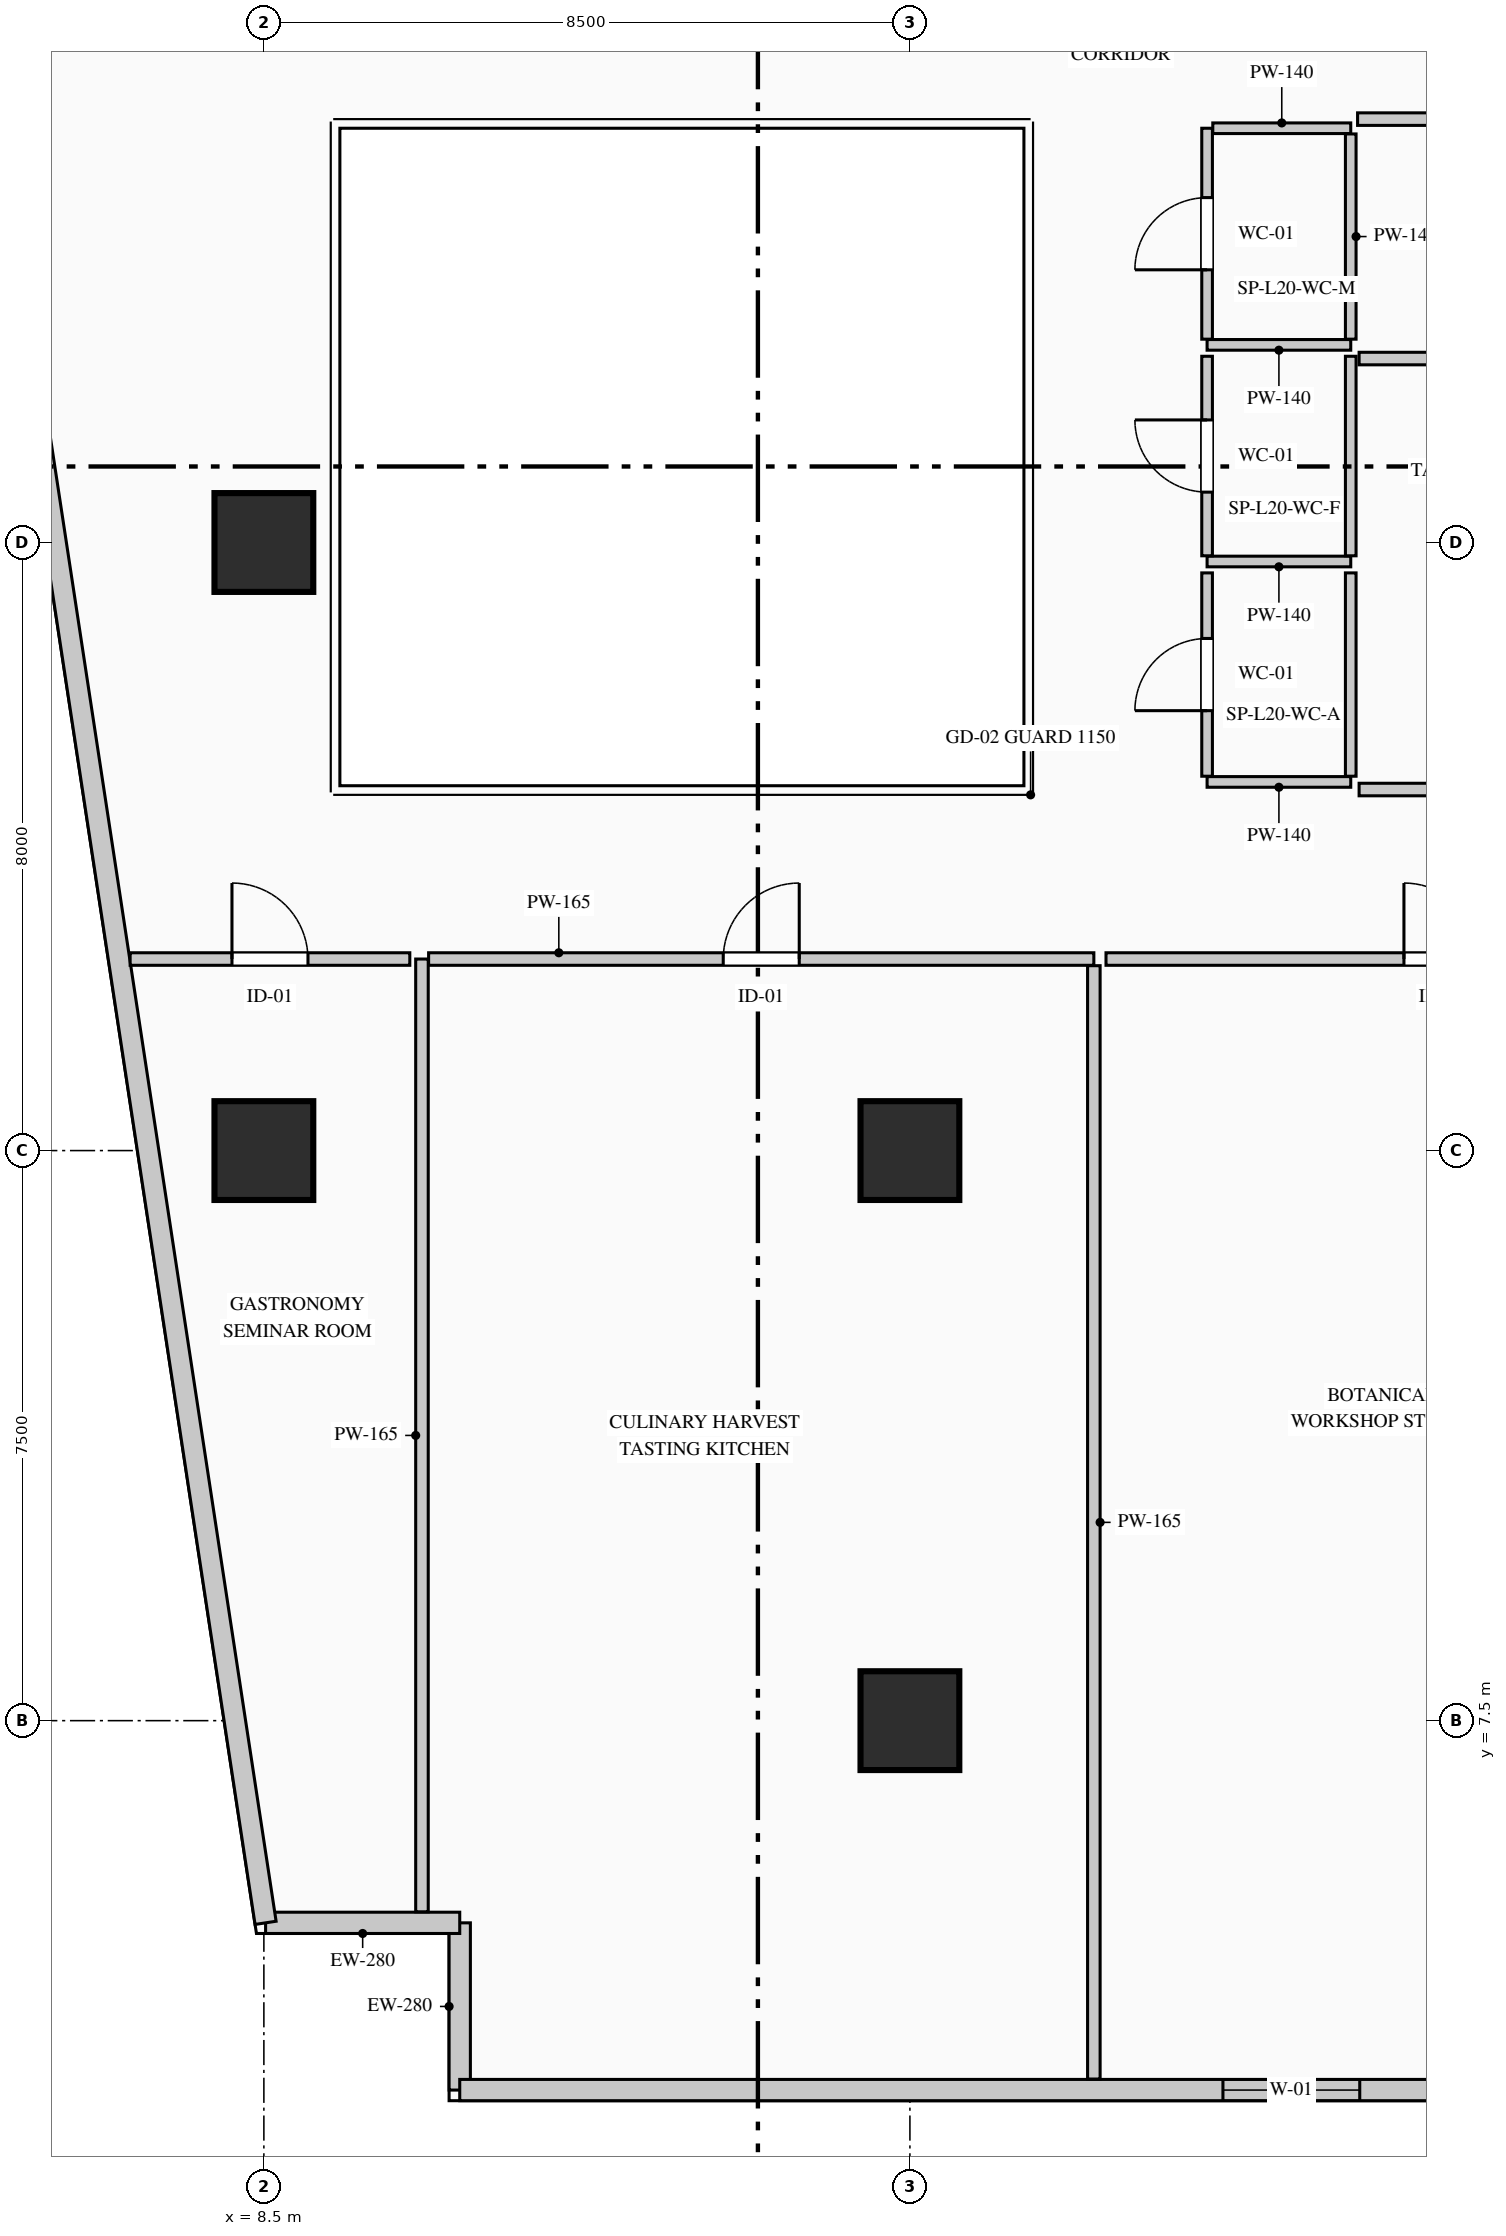
"""IFC4 building model, lengths in metres.
Left out: names, types, materials, properties, quantities, classifications, styles, units other than length and angle.
Written with IfcOpenShell. Run it as: python <this file> out.ifc"""

import sys

from ifc_helpers import new_model, si_unit, direction, frame, frame_2d, origin, origin_2d, place, context, subcontext, project, spatial, rectangle, extrude, element, fill, save


model = new_model("IFC4")
c1 = context("Model", 3, precision=1e-05, world=origin(), true_north=direction((0.0, 1.0)))
c2 = subcontext(c1, "Body", "Model", "MODEL_VIEW")
j1 = project(units=[si_unit("LENGTHUNIT", "METRE"), si_unit("PLANEANGLEUNIT", "RADIAN")], contexts=[c1])
p1 = place(None, origin())
s1 = spatial("IfcSite", under=j1, at=p1, CompositionType="ELEMENT")
p2 = place(p1, origin())
s2 = spatial("IfcBuilding", under=s1, at=p2, CompositionType="ELEMENT")
p3 = place(p2, frame((0.0, 0.0, 88.6)))
s3 = spatial("IfcBuildingStorey", under=s2, at=p3, CompositionType="ELEMENT", Elevation=88.6)
for number, where, z_axis, x_axis in (
    (1, (8.5, 15.0, 0.0), (0.0, 0.0, 1.0), (1.0, 0.0, 0.0)),
    (2, (8.5, 23.0, 0.0), (0.0, 0.0, 1.0), (1.0, 0.0, 0.0)),
    (3, (17.0, 7.5, 0.0), (0.0, 0.0, 1.0), (1.0, 0.0, 0.0)),
    (4, (17.0, 15.0, 0.0), (0.0, 0.0, 1.0), (1.0, 0.0, 0.0)),
):
    element("IfcColumn", number, at=place(p3, frame(where, z_axis=z_axis, x_axis=x_axis)), inside=s3, PredefinedType="COLUMN", context=c2, shape_type="SweptSolid", body=[
        extrude(rectangle(XDim=1.3, YDim=1.3, at=origin_2d()), origin(), (0.0, 0.0, 1.0), 4.4),
    ])
p4 = place(p3, frame((11.077, 2.64, 0.0), z_axis=(0.0, 0.0, 1.0), x_axis=(0.0, 1.0, 0.0)))
e5 = element("IfcWall", 5, at=p4, inside=s3, PredefinedType="STANDARD", context=c2, shape_type="SweptSolid", body=[
    extrude(rectangle(XDim=2.2, YDim=0.28, at=frame_2d((1.1, 0.0))), origin(), (0.0, 0.0, 1.0), 4.115),
])
p5 = place(p3, frame((11.077, 4.84, 0.0), z_axis=(0.0, 0.0, 1.0), x_axis=(-1.0, 0.0, 0.0)))
e6 = element("IfcWall", 6, at=p5, inside=s3, PredefinedType="STANDARD", context=c2, shape_type="SweptSolid", body=[
    extrude(rectangle(XDim=2.554, YDim=0.28, at=frame_2d((1.277, 0.0))), origin(), (0.0, 0.0, 1.0), 4.115),
])
p6 = place(p3, frame((8.523, 4.84, 0.0), z_axis=(0.0, 0.0, 1.0), x_axis=(-0.150394554312, 0.988626055712, 0.0)))
e7 = element("IfcWall", 7, at=p6, inside=s3, PredefinedType="STANDARD", context=c2, shape_type="SweptSolid", body=[
    extrude(rectangle(XDim=36.738, YDim=0.28, at=frame_2d((18.369, 0.0))), origin(), (0.0, 0.0, 1.0), 4.115),
])
p7 = place(p6, frame((22.612, 0.0, 0.9)))
e8 = element("IfcOpeningElement", 8, at=p7, cuts=e7, PredefinedType="OPENING", context=c2, shape_type="SweptSolid", body=[
    extrude(rectangle(XDim=1.8, YDim=2.1, at=frame_2d((0.9, 1.05))), frame((0.0, 0.15, 0.0), z_axis=(0.0, -1.0, 0.0), x_axis=(1.0, 0.0, 0.0)), (0.0, 0.0, 1.0), 0.3),
])
p8 = place(p3, frame((26.273, 2.64, 0.0), z_axis=(0.0, 0.0, 1.0), x_axis=(-1.0, 0.0, 0.0)))
e9 = element("IfcWall", 9, at=p8, inside=s3, PredefinedType="STANDARD", context=c2, shape_type="SweptSolid", body=[
    extrude(rectangle(XDim=15.197, YDim=0.28, at=frame_2d((7.598, 0.0))), origin(), (0.0, 0.0, 1.0), 4.115),
])
p9 = place(p8, frame((3.355, 0.0, 0.9)))
e10 = element("IfcOpeningElement", 10, at=p9, cuts=e9, PredefinedType="OPENING", context=c2, shape_type="SweptSolid", body=[
    extrude(rectangle(XDim=1.8, YDim=2.1, at=frame_2d((0.9, 1.05))), frame((0.0, 0.15, 0.0), z_axis=(0.0, -1.0, 0.0), x_axis=(1.0, 0.0, 0.0)), (0.0, 0.0, 1.0), 0.3),
])
p10 = place(p3, frame((22.8, 25.6, 0.0), z_axis=(0.0, 0.0, 1.0), x_axis=(-1.0, 0.0, 0.0)))
e11 = element("IfcWall", 11, at=p10, inside=s3, PredefinedType="PARTITIONING", context=c2, shape_type="SweptSolid", body=[
    extrude(rectangle(XDim=1.89, YDim=0.14, at=frame_2d((0.945, 0.0))), origin(), (0.0, 0.0, 1.0), 4.115),
])
p11 = place(p3, frame((20.91, 25.675, 0.0), z_axis=(0.0, 0.0, 1.0), x_axis=(0.0, 1.0, 0.0)))
e12 = element("IfcWall", 12, at=p11, inside=s3, PredefinedType="PARTITIONING", context=c2, shape_type="SweptSolid", body=[
    extrude(rectangle(XDim=2.775, YDim=0.14, at=frame_2d((1.387, 0.0))), origin(), (0.0, 0.0, 1.0), 4.115),
])
p12 = place(p11, frame((0.913, 0.0, 0.0)))
e13 = element("IfcOpeningElement", 13, at=p12, cuts=e12, PredefinedType="OPENING", context=c2, shape_type="SweptSolid", body=[
    extrude(rectangle(XDim=0.95, YDim=2.15, at=frame_2d((0.475, 1.075))), frame((0.0, 0.08, 0.0), z_axis=(0.0, -1.0, 0.0), x_axis=(1.0, 0.0, 0.0)), (0.0, 0.0, 1.0), 0.16),
])
p13 = place(p3, frame((20.985, 28.45, 0.0), z_axis=(0.0, 0.0, 1.0), x_axis=(1.0, 0.0, 0.0)))
e14 = element("IfcWall", 14, at=p13, inside=s3, PredefinedType="PARTITIONING", context=c2, shape_type="SweptSolid", body=[
    extrude(rectangle(XDim=1.815, YDim=0.14, at=frame_2d((0.907, 0.0))), origin(), (0.0, 0.0, 1.0), 4.115),
])
p14 = place(p3, frame((22.8, 28.375, 0.0), z_axis=(0.0, 0.0, 1.0), x_axis=(0.0, -1.0, 0.0)))
e15 = element("IfcWall", 15, at=p14, inside=s3, PredefinedType="PARTITIONING", context=c2, shape_type="SweptSolid", body=[
    extrude(rectangle(XDim=2.7, YDim=0.14, at=frame_2d((1.35, 0.0))), origin(), (0.0, 0.0, 1.0), 3.8),
])
p15 = place(p3, frame((22.8, 22.75, 0.0), z_axis=(0.0, 0.0, 1.0), x_axis=(-1.0, 0.0, 0.0)))
e16 = element("IfcWall", 16, at=p15, inside=s3, PredefinedType="PARTITIONING", context=c2, shape_type="SweptSolid", body=[
    extrude(rectangle(XDim=1.89, YDim=0.14, at=frame_2d((0.945, 0.0))), origin(), (0.0, 0.0, 1.0), 4.115),
])
p16 = place(p3, frame((20.91, 22.825, 0.0), z_axis=(0.0, 0.0, 1.0), x_axis=(0.0, 1.0, 0.0)))
e17 = element("IfcWall", 17, at=p16, inside=s3, PredefinedType="PARTITIONING", context=c2, shape_type="SweptSolid", body=[
    extrude(rectangle(XDim=2.625, YDim=0.14, at=frame_2d((1.312, 0.0))), origin(), (0.0, 0.0, 1.0), 4.115),
])
p17 = place(p16, frame((0.837, 0.0, 0.0)))
e18 = element("IfcOpeningElement", 18, at=p17, cuts=e17, PredefinedType="OPENING", context=c2, shape_type="SweptSolid", body=[
    extrude(rectangle(XDim=0.95, YDim=2.15, at=frame_2d((0.475, 1.075))), frame((0.0, 0.08, 0.0), z_axis=(0.0, -1.0, 0.0), x_axis=(1.0, 0.0, 0.0)), (0.0, 0.0, 1.0), 0.16),
])
p18 = place(p3, frame((22.8, 25.45, 0.0), z_axis=(0.0, 0.0, 1.0), x_axis=(0.0, -1.0, 0.0)))
e19 = element("IfcWall", 19, at=p18, inside=s3, PredefinedType="PARTITIONING", context=c2, shape_type="SweptSolid", body=[
    extrude(rectangle(XDim=2.625, YDim=0.14, at=frame_2d((1.312, 0.0))), origin(), (0.0, 0.0, 1.0), 3.8),
])
p19 = place(p3, frame((22.8, 19.85, 0.0), z_axis=(0.0, 0.0, 1.0), x_axis=(-1.0, 0.0, 0.0)))
e20 = element("IfcWall", 20, at=p19, inside=s3, PredefinedType="PARTITIONING", context=c2, shape_type="SweptSolid", body=[
    extrude(rectangle(XDim=1.89, YDim=0.14, at=frame_2d((0.945, 0.0))), origin(), (0.0, 0.0, 1.0), 4.115),
])
p20 = place(p3, frame((20.91, 19.925, 0.0), z_axis=(0.0, 0.0, 1.0), x_axis=(0.0, 1.0, 0.0)))
e21 = element("IfcWall", 21, at=p20, inside=s3, PredefinedType="PARTITIONING", context=c2, shape_type="SweptSolid", body=[
    extrude(rectangle(XDim=2.675, YDim=0.14, at=frame_2d((1.337, 0.0))), origin(), (0.0, 0.0, 1.0), 4.115),
])
p21 = place(p20, frame((0.863, 0.0, 0.0)))
e22 = element("IfcOpeningElement", 22, at=p21, cuts=e21, PredefinedType="OPENING", context=c2, shape_type="SweptSolid", body=[
    extrude(rectangle(XDim=0.95, YDim=2.15, at=frame_2d((0.475, 1.075))), frame((0.0, 0.08, 0.0), z_axis=(0.0, -1.0, 0.0), x_axis=(1.0, 0.0, 0.0)), (0.0, 0.0, 1.0), 0.16),
])
p22 = place(p3, frame((22.8, 22.6, 0.0), z_axis=(0.0, 0.0, 1.0), x_axis=(0.0, -1.0, 0.0)))
e23 = element("IfcWall", 23, at=p22, inside=s3, PredefinedType="PARTITIONING", context=c2, shape_type="SweptSolid", body=[
    extrude(rectangle(XDim=2.675, YDim=0.14, at=frame_2d((1.337, 0.0))), origin(), (0.0, 0.0, 1.0), 3.8),
])
p23 = place(p3, frame((10.58, 4.985, 0.0), z_axis=(0.0, 0.0, 1.0), x_axis=(0.0, 1.0, 0.0)))
e24 = element("IfcWall", 24, at=p23, inside=s3, PredefinedType="PARTITIONING", context=c2, shape_type="SweptSolid", body=[
    extrude(rectangle(XDim=12.535, YDim=0.165, at=frame_2d((6.268, 0.0))), origin(), (0.0, 0.0, 1.0), 4.115),
])
p24 = place(p3, frame((10.667, 17.52, 0.0), z_axis=(0.0, 0.0, 1.0), x_axis=(1.0, 0.0, 0.0)))
e25 = element("IfcWall", 25, at=p24, inside=s3, PredefinedType="PARTITIONING", context=c2, shape_type="SweptSolid", body=[
    extrude(rectangle(XDim=8.752, YDim=0.165, at=frame_2d((4.376, 0.0))), origin(), (0.0, 0.0, 1.0), 4.115),
])
p25 = place(p24, frame((3.876, 0.0, 0.0)))
e26 = element("IfcOpeningElement", 26, at=p25, cuts=e25, PredefinedType="OPENING", context=c2, shape_type="SweptSolid", body=[
    extrude(rectangle(XDim=1.0, YDim=2.15, at=frame_2d((0.5, 1.075))), frame((0.0, 0.093, 0.0), z_axis=(0.0, -1.0, 0.0), x_axis=(1.0, 0.0, 0.0)), (0.0, 0.0, 1.0), 0.185),
])
p26 = place(p3, frame((19.42, 17.433, 0.0), z_axis=(0.0, 0.0, 1.0), x_axis=(0.0, -1.0, 0.0)))
e27 = element("IfcWall", 27, at=p26, inside=s3, PredefinedType="PARTITIONING", context=c2, shape_type="SweptSolid", body=[
    extrude(rectangle(XDim=14.648, YDim=0.165, at=frame_2d((7.324, 0.0))), origin(), (0.0, 0.0, 1.0), 3.8),
])
p27 = place(p3, frame((19.58, 17.52, 0.0), z_axis=(0.0, 0.0, 1.0), x_axis=(1.0, 0.0, 0.0)))
e28 = element("IfcWall", 28, at=p27, inside=s3, PredefinedType="PARTITIONING", context=c2, shape_type="SweptSolid", body=[
    extrude(rectangle(XDim=8.84, YDim=0.165, at=frame_2d((4.42, 0.0))), origin(), (0.0, 0.0, 1.0), 3.8),
])
p28 = place(p27, frame((3.92, 0.0, 0.0)))
e29 = element("IfcOpeningElement", 29, at=p28, cuts=e28, PredefinedType="OPENING", context=c2, shape_type="SweptSolid", body=[
    extrude(rectangle(XDim=1.0, YDim=2.15, at=frame_2d((0.5, 1.075))), frame((0.0, 0.093, 0.0), z_axis=(0.0, -1.0, 0.0), x_axis=(1.0, 0.0, 0.0)), (0.0, 0.0, 1.0), 0.185),
])
p29 = place(p3, frame((6.74, 17.52, 0.0), z_axis=(0.0, 0.0, 1.0), x_axis=(1.0, 0.0, 0.0)))
e30 = element("IfcWall", 30, at=p29, inside=s3, PredefinedType="PARTITIONING", context=c2, shape_type="SweptSolid", body=[
    extrude(rectangle(XDim=3.679, YDim=0.165, at=frame_2d((1.84, 0.0))), origin(), (0.0, 0.0, 1.0), 4.115),
])
p30 = place(p29, frame((1.34, 0.0, 0.0)))
e31 = element("IfcOpeningElement", 31, at=p30, cuts=e30, PredefinedType="OPENING", context=c2, shape_type="SweptSolid", body=[
    extrude(rectangle(XDim=1.0, YDim=2.15, at=frame_2d((0.5, 1.075))), frame((0.0, 0.093, 0.0), z_axis=(0.0, -1.0, 0.0), x_axis=(1.0, 0.0, 0.0)), (0.0, 0.0, 1.0), 0.185),
])
p31 = place(p3, frame((25.956, 19.75, 0.0), z_axis=(0.0, 0.0, 1.0), x_axis=(-1.0, 0.0, 0.0)))
e32 = element("IfcWall", 32, at=p31, inside=s3, PredefinedType="PARTITIONING", context=c2, shape_type="SweptSolid", body=[
    extrude(rectangle(XDim=3.046, YDim=0.165, at=frame_2d((1.523, 0.0))), origin(), (0.0, 0.0, 1.0), 4.115),
])
p32 = place(p31, frame((1.023, 0.0, 0.0)))
e33 = element("IfcOpeningElement", 33, at=p32, cuts=e32, PredefinedType="OPENING", context=c2, shape_type="SweptSolid", body=[
    extrude(rectangle(XDim=1.0, YDim=2.15, at=frame_2d((0.5, 1.075))), frame((0.0, 0.093, 0.0), z_axis=(0.0, -1.0, 0.0), x_axis=(1.0, 0.0, 0.0)), (0.0, 0.0, 1.0), 0.185),
])
p33 = place(p3, frame((22.91, 25.42, 0.0), z_axis=(0.0, 0.0, 1.0), x_axis=(1.0, 0.0, 0.0)))
e34 = element("IfcWall", 34, at=p33, inside=s3, PredefinedType="PARTITIONING", context=c2, shape_type="SweptSolid", body=[
    extrude(rectangle(XDim=5.51, YDim=0.165, at=frame_2d((2.755, 0.0))), origin(), (0.0, 0.0, 1.0), 3.8),
])
p34 = place(p3, frame((22.89, 28.57, 0.0), z_axis=(0.0, 0.0, 1.0), x_axis=(1.0, 0.0, 0.0)))
e35 = element("IfcWall", 35, at=p34, inside=s3, PredefinedType="PARTITIONING", context=c2, shape_type="SweptSolid", body=[
    extrude(rectangle(XDim=5.53, YDim=0.165, at=frame_2d((2.765, 0.0))), origin(), (0.0, 0.0, 1.0), 3.8),
])
p35 = place(p34, frame((2.265, 0.0, 0.0)))
e36 = element("IfcOpeningElement", 36, at=p35, cuts=e35, PredefinedType="OPENING", context=c2, shape_type="SweptSolid", body=[
    extrude(rectangle(XDim=1.0, YDim=2.15, at=frame_2d((0.5, 1.075))), frame((0.0, 0.093, 0.0), z_axis=(0.0, -1.0, 0.0), x_axis=(1.0, 0.0, 0.0)), (0.0, 0.0, 1.0), 0.185),
])
p36 = place(p9, origin())
e37 = element("IfcWindow", 37, at=p36, inside=s3, PartitioningType="SINGLE_PANEL", PredefinedType="WINDOW", context=c2, shape_type="SweptSolid", body=[
    extrude(rectangle(XDim=1.8, YDim=2.1, at=frame_2d((0.9, 1.05))), frame((0.0, 0.03, 0.0), z_axis=(0.0, -1.0, 0.0), x_axis=(1.0, 0.0, 0.0)), (0.0, 0.0, 1.0), 0.06),
])
fill(e10, e37)
p37 = place(p12, origin())
e38 = element("IfcDoor", 38, at=p37, inside=s3, OperationType="SINGLE_SWING_LEFT", PredefinedType="DOOR", context=c2, shape_type="SweptSolid", body=[
    extrude(rectangle(XDim=0.95, YDim=2.15, at=frame_2d((0.475, 1.075))), frame((0.0, 0.025, 0.0), z_axis=(0.0, -1.0, 0.0), x_axis=(1.0, 0.0, 0.0)), (0.0, 0.0, 1.0), 0.05),
])
fill(e13, e38)
p38 = place(p17, origin())
e39 = element("IfcDoor", 39, at=p38, inside=s3, OperationType="SINGLE_SWING_RIGHT", PredefinedType="DOOR", context=c2, shape_type="SweptSolid", body=[
    extrude(rectangle(XDim=0.95, YDim=2.15, at=frame_2d((0.475, 1.075))), frame((0.0, 0.025, 0.0), z_axis=(0.0, -1.0, 0.0), x_axis=(1.0, 0.0, 0.0)), (0.0, 0.0, 1.0), 0.05),
])
fill(e18, e39)
p39 = place(p21, origin())
e40 = element("IfcDoor", 40, at=p39, inside=s3, OperationType="SINGLE_SWING_LEFT", PredefinedType="DOOR", context=c2, shape_type="SweptSolid", body=[
    extrude(rectangle(XDim=0.95, YDim=2.15, at=frame_2d((0.475, 1.075))), frame((0.0, 0.025, 0.0), z_axis=(0.0, -1.0, 0.0), x_axis=(1.0, 0.0, 0.0)), (0.0, 0.0, 1.0), 0.05),
])
fill(e22, e40)
p40 = place(p25, origin())
e41 = element("IfcDoor", 41, at=p40, inside=s3, OperationType="SINGLE_SWING_RIGHT", PredefinedType="DOOR", context=c2, shape_type="SweptSolid", body=[
    extrude(rectangle(XDim=1.0, YDim=2.15, at=frame_2d((0.5, 1.075))), frame((0.0, 0.025, 0.0), z_axis=(0.0, -1.0, 0.0), x_axis=(1.0, 0.0, 0.0)), (0.0, 0.0, 1.0), 0.05),
])
fill(e26, e41)
p41 = place(p28, origin())
e42 = element("IfcDoor", 42, at=p41, inside=s3, OperationType="SINGLE_SWING_LEFT", PredefinedType="DOOR", context=c2, shape_type="SweptSolid", body=[
    extrude(rectangle(XDim=1.0, YDim=2.15, at=frame_2d((0.5, 1.075))), frame((0.0, 0.025, 0.0), z_axis=(0.0, -1.0, 0.0), x_axis=(1.0, 0.0, 0.0)), (0.0, 0.0, 1.0), 0.05),
])
fill(e29, e42)
p42 = place(p30, origin())
e43 = element("IfcDoor", 43, at=p42, inside=s3, OperationType="SINGLE_SWING_LEFT", PredefinedType="DOOR", context=c2, shape_type="SweptSolid", body=[
    extrude(rectangle(XDim=1.0, YDim=2.15, at=frame_2d((0.5, 1.075))), frame((0.0, 0.025, 0.0), z_axis=(0.0, -1.0, 0.0), x_axis=(1.0, 0.0, 0.0)), (0.0, 0.0, 1.0), 0.05),
])
fill(e31, e43)
save(model, sys.argv[1])
